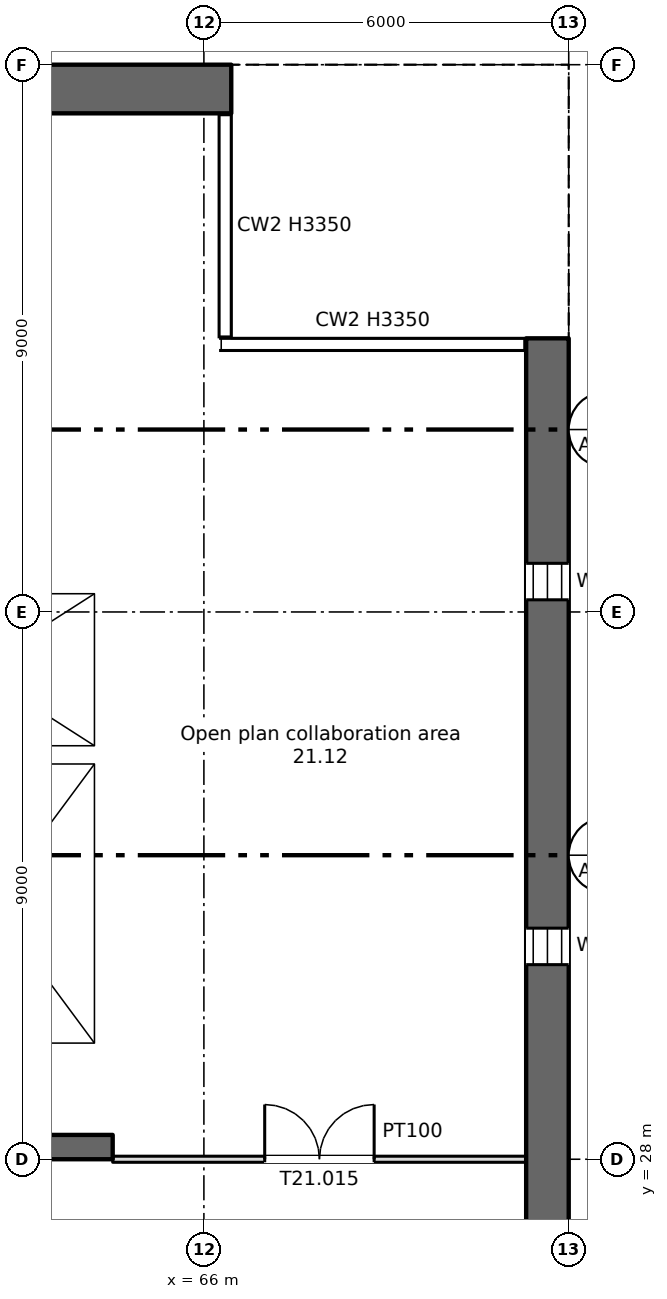
"""IFC4 building model, lengths in metres.
Left out: names, types, materials, properties, quantities, classifications, styles, units other than length and angle.
Written with IfcOpenShell. Run it as: python <this file> out.ifc"""

import sys

from ifc_helpers import new_model, si_unit, direction, frame, frame_2d, origin, place, context, subcontext, project, spatial, rectangle, extrude, element, fill, save


model = new_model("IFC4")
c1 = context("Model", 3, precision=1e-05, world=origin(), true_north=direction((0.0, 1.0)))
c2 = subcontext(c1, "Body", "Model", "MODEL_VIEW")
j1 = project(units=[si_unit("LENGTHUNIT", "METRE"), si_unit("PLANEANGLEUNIT", "RADIAN")], contexts=[c1])
p1 = place(None, origin())
s1 = spatial("IfcSite", under=j1, at=p1, CompositionType="ELEMENT")
p2 = place(p1, origin())
s2 = spatial("IfcBuilding", under=s1, at=p2, CompositionType="ELEMENT")
p3 = place(p2, frame((0.0, 0.0, 136.25)))
s3 = spatial("IfcBuildingStorey", under=s2, at=p3, CompositionType="ELEMENT", Elevation=136.25)
p4 = place(p3, frame((71.65, 6.0, 0.0), z_axis=(0.0, 0.0, 1.0), x_axis=(0.0, 1.0, 0.0)))
e1 = element("IfcWall", 1, at=p4, inside=s3, PredefinedType="SHEAR", context=c2, shape_type="SweptSolid", body=[
    extrude(rectangle(XDim=35.5, YDim=0.7, at=frame_2d((17.75, 0.0))), origin(), (0.0, 0.0, 1.0), 3.35),
])
p5 = place(p4, frame((1.2, 0.0, 0.6)))
e2 = element("IfcOpeningElement", 2, at=p5, cuts=e1, PredefinedType="OPENING", context=c2, shape_type="SweptSolid", body=[
    extrude(rectangle(XDim=0.6, YDim=2.4, at=frame_2d((0.3, 1.2))), frame((0.0, 0.36, 0.0), z_axis=(0.0, -1.0, 0.0), x_axis=(1.0, 0.0, 0.0)), (0.0, 0.0, 1.0), 0.72),
])
p6 = place(p4, frame((7.2, 0.0, 0.6)))
e3 = element("IfcOpeningElement", 3, at=p6, cuts=e1, PredefinedType="OPENING", context=c2, shape_type="SweptSolid", body=[
    extrude(rectangle(XDim=0.6, YDim=2.4, at=frame_2d((0.3, 1.2))), frame((0.0, 0.36, 0.0), z_axis=(0.0, -1.0, 0.0), x_axis=(1.0, 0.0, 0.0)), (0.0, 0.0, 1.0), 0.72),
])
p7 = place(p4, frame((13.2, 0.0, 0.6)))
e4 = element("IfcOpeningElement", 4, at=p7, cuts=e1, PredefinedType="OPENING", context=c2, shape_type="SweptSolid", body=[
    extrude(rectangle(XDim=0.6, YDim=2.4, at=frame_2d((0.3, 1.2))), frame((0.0, 0.36, 0.0), z_axis=(0.0, -1.0, 0.0), x_axis=(1.0, 0.0, 0.0)), (0.0, 0.0, 1.0), 0.72),
])
p8 = place(p4, frame((19.2, 0.0, 0.6)))
e5 = element("IfcOpeningElement", 5, at=p8, cuts=e1, PredefinedType="OPENING", context=c2, shape_type="SweptSolid", body=[
    extrude(rectangle(XDim=0.6, YDim=2.4, at=frame_2d((0.3, 1.2))), frame((0.0, 0.36, 0.0), z_axis=(0.0, -1.0, 0.0), x_axis=(1.0, 0.0, 0.0)), (0.0, 0.0, 1.0), 0.72),
])
p9 = place(p4, frame((25.2, 0.0, 0.6)))
e6 = element("IfcOpeningElement", 6, at=p9, cuts=e1, PredefinedType="OPENING", context=c2, shape_type="SweptSolid", body=[
    extrude(rectangle(XDim=0.6, YDim=2.4, at=frame_2d((0.3, 1.2))), frame((0.0, 0.36, 0.0), z_axis=(0.0, -1.0, 0.0), x_axis=(1.0, 0.0, 0.0)), (0.0, 0.0, 1.0), 0.72),
])
p10 = place(p4, frame((31.2, 0.0, 0.6)))
e7 = element("IfcOpeningElement", 7, at=p10, cuts=e1, PredefinedType="OPENING", context=c2, shape_type="SweptSolid", body=[
    extrude(rectangle(XDim=0.6, YDim=2.4, at=frame_2d((0.3, 1.2))), frame((0.0, 0.36, 0.0), z_axis=(0.0, -1.0, 0.0), x_axis=(1.0, 0.0, 0.0)), (0.0, 0.0, 1.0), 0.72),
])
p11 = place(p3, frame((5.55, 45.6, 0.0), z_axis=(0.0, 0.0, 1.0), x_axis=(1.0, 0.0, 0.0)))
e8 = element("IfcWall", 8, at=p11, inside=s3, PredefinedType="SHEAR", context=c2, shape_type="SweptSolid", body=[
    extrude(rectangle(XDim=60.9, YDim=0.8, at=frame_2d((30.45, 0.0))), origin(), (0.0, 0.0, 1.0), 3.35),
])
p12 = place(p11, frame((1.2, 0.0, 0.6)))
e9 = element("IfcOpeningElement", 9, at=p12, cuts=e8, PredefinedType="OPENING", context=c2, shape_type="SweptSolid", body=[
    extrude(rectangle(XDim=0.6, YDim=2.4, at=frame_2d((0.3, 1.2))), frame((0.0, 0.41, 0.0), z_axis=(0.0, -1.0, 0.0), x_axis=(1.0, 0.0, 0.0)), (0.0, 0.0, 1.0), 0.82),
])
p13 = place(p11, frame((7.2, 0.0, 0.6)))
e10 = element("IfcOpeningElement", 10, at=p13, cuts=e8, PredefinedType="OPENING", context=c2, shape_type="SweptSolid", body=[
    extrude(rectangle(XDim=0.6, YDim=2.4, at=frame_2d((0.3, 1.2))), frame((0.0, 0.41, 0.0), z_axis=(0.0, -1.0, 0.0), x_axis=(1.0, 0.0, 0.0)), (0.0, 0.0, 1.0), 0.82),
])
p14 = place(p11, frame((55.2, 0.0, 0.6)))
e11 = element("IfcOpeningElement", 11, at=p14, cuts=e8, PredefinedType="OPENING", context=c2, shape_type="SweptSolid", body=[
    extrude(rectangle(XDim=0.6, YDim=2.4, at=frame_2d((0.3, 1.2))), frame((0.0, 0.41, 0.0), z_axis=(0.0, -1.0, 0.0), x_axis=(1.0, 0.0, 0.0)), (0.0, 0.0, 1.0), 0.82),
])
p15 = place(p3, frame((6.7, 28.2, 0.0), z_axis=(0.0, 0.0, 1.0), x_axis=(1.0, 0.0, 0.0)))
e12 = element("IfcWall", 12, at=p15, inside=s3, PredefinedType="SHEAR", context=c2, shape_type="SweptSolid", body=[
    extrude(rectangle(XDim=57.8, YDim=0.4, at=frame_2d((28.9, 0.0))), origin(), (0.0, 0.0, 1.0), 3.35),
])
p16 = place(p15, frame((12.812, 0.0, 0.0)))
e13 = element("IfcOpeningElement", 13, at=p16, cuts=e12, PredefinedType="OPENING", context=c2, shape_type="SweptSolid", body=[
    extrude(rectangle(XDim=0.9, YDim=2.1, at=frame_2d((0.45, 1.05))), frame((0.0, 0.21, 0.0), z_axis=(0.0, -1.0, 0.0), x_axis=(1.0, 0.0, 0.0)), (0.0, 0.0, 1.0), 0.42),
])
p17 = place(p15, frame((15.387, 0.0, 0.0)))
e14 = element("IfcOpeningElement", 14, at=p17, cuts=e12, PredefinedType="OPENING", context=c2, shape_type="SweptSolid", body=[
    extrude(rectangle(XDim=0.9, YDim=2.1, at=frame_2d((0.45, 1.05))), frame((0.0, 0.21, 0.0), z_axis=(0.0, -1.0, 0.0), x_axis=(1.0, 0.0, 0.0)), (0.0, 0.0, 1.0), 0.42),
])
p18 = place(p15, frame((48.312, 0.0, 0.0)))
e15 = element("IfcOpeningElement", 15, at=p18, cuts=e12, PredefinedType="OPENING", context=c2, shape_type="SweptSolid", body=[
    extrude(rectangle(XDim=0.9, YDim=2.1, at=frame_2d((0.45, 1.05))), frame((0.0, 0.21, 0.0), z_axis=(0.0, -1.0, 0.0), x_axis=(1.0, 0.0, 0.0)), (0.0, 0.0, 1.0), 0.42),
])
p19 = place(p15, frame((50.887, 0.0, 0.0)))
e16 = element("IfcOpeningElement", 16, at=p19, cuts=e12, PredefinedType="OPENING", context=c2, shape_type="SweptSolid", body=[
    extrude(rectangle(XDim=0.9, YDim=2.1, at=frame_2d((0.45, 1.05))), frame((0.0, 0.21, 0.0), z_axis=(0.0, -1.0, 0.0), x_axis=(1.0, 0.0, 0.0)), (0.0, 0.0, 1.0), 0.42),
])
p20 = place(p15, frame((0.562, 0.0, 0.0)))
e17 = element("IfcOpeningElement", 17, at=p20, cuts=e12, PredefinedType="OPENING", context=c2, shape_type="SweptSolid", body=[
    extrude(rectangle(XDim=0.9, YDim=2.1, at=frame_2d((0.45, 1.05))), frame((0.0, 0.21, 0.0), z_axis=(0.0, -1.0, 0.0), x_axis=(1.0, 0.0, 0.0)), (0.0, 0.0, 1.0), 0.42),
])
p21 = place(p15, frame((2.137, 0.0, 0.0)))
e18 = element("IfcOpeningElement", 18, at=p21, cuts=e12, PredefinedType="OPENING", context=c2, shape_type="SweptSolid", body=[
    extrude(rectangle(XDim=0.9, YDim=2.1, at=frame_2d((0.45, 1.05))), frame((0.0, 0.21, 0.0), z_axis=(0.0, -1.0, 0.0), x_axis=(1.0, 0.0, 0.0)), (0.0, 0.0, 1.0), 0.42),
])
p22 = place(p15, frame((4.7, 0.0, 0.0)))
e19 = element("IfcOpeningElement", 19, at=p22, cuts=e12, PredefinedType="OPENING", context=c2, shape_type="SweptSolid", body=[
    extrude(rectangle(XDim=1.2, YDim=2.1, at=frame_2d((0.6, 1.05))), frame((0.0, 0.21, 0.0), z_axis=(0.0, -1.0, 0.0), x_axis=(1.0, 0.0, 0.0)), (0.0, 0.0, 1.0), 0.42),
])
p23 = place(p15, frame((31.7, 0.0, 0.0)))
e20 = element("IfcOpeningElement", 20, at=p23, cuts=e12, PredefinedType="OPENING", context=c2, shape_type="SweptSolid", body=[
    extrude(rectangle(XDim=1.2, YDim=2.1, at=frame_2d((0.6, 1.05))), frame((0.0, 0.21, 0.0), z_axis=(0.0, -1.0, 0.0), x_axis=(1.0, 0.0, 0.0)), (0.0, 0.0, 1.0), 0.42),
])
p24 = place(p15, frame((55.2, 0.0, 0.0)))
e21 = element("IfcOpeningElement", 21, at=p24, cuts=e12, PredefinedType="OPENING", context=c2, shape_type="SweptSolid", body=[
    extrude(rectangle(XDim=1.2, YDim=2.1, at=frame_2d((0.6, 1.05))), frame((0.0, 0.21, 0.0), z_axis=(0.0, -1.0, 0.0), x_axis=(1.0, 0.0, 0.0)), (0.0, 0.0, 1.0), 0.42),
])
p25 = place(p15, frame((21.7, 0.0, 0.0)))
e22 = element("IfcOpeningElement", 22, at=p25, cuts=e12, PredefinedType="OPENING", context=c2, shape_type="SweptSolid", body=[
    extrude(rectangle(XDim=1.2, YDim=2.1, at=frame_2d((0.6, 1.05))), frame((0.0, 0.21, 0.0), z_axis=(0.0, -1.0, 0.0), x_axis=(1.0, 0.0, 0.0)), (0.0, 0.0, 1.0), 0.42),
])
p26 = place(p15, frame((41.7, 0.0, 0.0)))
e23 = element("IfcOpeningElement", 23, at=p26, cuts=e12, PredefinedType="OPENING", context=c2, shape_type="SweptSolid", body=[
    extrude(rectangle(XDim=1.2, YDim=2.1, at=frame_2d((0.6, 1.05))), frame((0.0, 0.21, 0.0), z_axis=(0.0, -1.0, 0.0), x_axis=(1.0, 0.0, 0.0)), (0.0, 0.0, 1.0), 0.42),
])
p27 = place(p15, frame((24.85, 0.0, 0.0)))
e24 = element("IfcOpeningElement", 24, at=p27, cuts=e12, PredefinedType="OPENING", context=c2, shape_type="SweptSolid", body=[
    extrude(rectangle(XDim=2.4, YDim=2.1, at=frame_2d((1.2, 1.05))), frame((0.0, 0.21, 0.0), z_axis=(0.0, -1.0, 0.0), x_axis=(1.0, 0.0, 0.0)), (0.0, 0.0, 1.0), 0.42),
])
p28 = place(p15, frame((37.35, 0.0, 0.0)))
e25 = element("IfcOpeningElement", 25, at=p28, cuts=e12, PredefinedType="OPENING", context=c2, shape_type="SweptSolid", body=[
    extrude(rectangle(XDim=2.4, YDim=2.1, at=frame_2d((1.2, 1.05))), frame((0.0, 0.21, 0.0), z_axis=(0.0, -1.0, 0.0), x_axis=(1.0, 0.0, 0.0)), (0.0, 0.0, 1.0), 0.42),
])
p29 = place(p15, frame((7.95, 0.0, 0.0)))
e26 = element("IfcOpeningElement", 26, at=p29, cuts=e12, PredefinedType="OPENING", context=c2, shape_type="SweptSolid", body=[
    extrude(rectangle(XDim=2.4, YDim=2.1, at=frame_2d((1.2, 1.05))), frame((0.0, 0.21, 0.0), z_axis=(0.0, -1.0, 0.0), x_axis=(1.0, 0.0, 0.0)), (0.0, 0.0, 1.0), 0.42),
])
p30 = place(p15, frame((28.85, 0.0, 0.0)))
e27 = element("IfcOpeningElement", 27, at=p30, cuts=e12, PredefinedType="OPENING", context=c2, shape_type="SweptSolid", body=[
    extrude(rectangle(XDim=0.9, YDim=2.1, at=frame_2d((0.45, 1.05))), frame((0.0, 0.21, 0.0), z_axis=(0.0, -1.0, 0.0), x_axis=(1.0, 0.0, 0.0)), (0.0, 0.0, 1.0), 0.42),
])
p31 = place(p15, frame((34.85, 0.0, 0.0)))
e28 = element("IfcOpeningElement", 28, at=p31, cuts=e12, PredefinedType="OPENING", context=c2, shape_type="SweptSolid", body=[
    extrude(rectangle(XDim=0.9, YDim=2.1, at=frame_2d((0.45, 1.05))), frame((0.0, 0.21, 0.0), z_axis=(0.0, -1.0, 0.0), x_axis=(1.0, 0.0, 0.0)), (0.0, 0.0, 1.0), 0.42),
])
p32 = place(p3, frame((64.35, 34.8, 0.0), z_axis=(0.0, 0.0, 1.0), x_axis=(0.0, 1.0, 0.0)))
e29 = element("IfcWall", 29, at=p32, inside=s3, PredefinedType="SHEAR", context=c2, shape_type="SweptSolid", body=[
    extrude(rectangle(XDim=10.4, YDim=0.3, at=frame_2d((5.2, 0.0))), origin(), (0.0, 0.0, 1.0), 3.35),
])
p33 = place(p3, frame((64.35, 28.4, 0.0), z_axis=(0.0, 0.0, 1.0), x_axis=(0.0, 1.0, 0.0)))
e30 = element("IfcWall", 30, at=p33, inside=s3, PredefinedType="SHEAR", context=c2, shape_type="SweptSolid", body=[
    extrude(rectangle(XDim=6.1, YDim=0.3, at=frame_2d((3.05, 0.0))), origin(), (0.0, 0.0, 1.0), 3.35),
])
p34 = place(p3, frame((60.3, 34.65, 0.0), z_axis=(0.0, 0.0, 1.0), x_axis=(1.0, 0.0, 0.0)))
e31 = element("IfcWall", 31, at=p34, inside=s3, PredefinedType="SHEAR", context=c2, shape_type="SweptSolid", body=[
    extrude(rectangle(XDim=4.2, YDim=0.3, at=frame_2d((2.1, 0.0))), origin(), (0.0, 0.0, 1.0), 3.35),
])
p35 = place(p3, frame((60.3, 37.45, 0.0), z_axis=(0.0, 0.0, 1.0), x_axis=(1.0, 0.0, 0.0)))
e32 = element("IfcWall", 32, at=p35, inside=s3, PredefinedType="SHEAR", context=c2, shape_type="SweptSolid", body=[
    extrude(rectangle(XDim=3.9, YDim=0.3, at=frame_2d((1.95, 0.0))), origin(), (0.0, 0.0, 1.0), 3.35),
])
p36 = place(p35, frame((1.4, 0.0, 0.0)))
e33 = element("IfcOpeningElement", 33, at=p36, cuts=e32, PredefinedType="OPENING", context=c2, shape_type="SweptSolid", body=[
    extrude(rectangle(XDim=1.1, YDim=2.1, at=frame_2d((0.55, 1.05))), frame((0.0, 0.16, 0.0), z_axis=(0.0, -1.0, 0.0), x_axis=(1.0, 0.0, 0.0)), (0.0, 0.0, 1.0), 0.32),
])
p37 = place(p3, frame((64.5, 28.0, 0.0), z_axis=(0.0, 0.0, 1.0), x_axis=(1.0, 0.0, 0.0)))
e34 = element("IfcWall", 34, at=p37, inside=s3, PredefinedType="PARTITIONING", context=c2, shape_type="SweptSolid", body=[
    extrude(rectangle(XDim=6.8, YDim=0.1, at=frame_2d((3.4, 0.0))), origin(), (0.0, 0.0, 1.0), 3.35),
])
p38 = place(p37, frame((2.5, 0.0, 0.0)))
e35 = element("IfcOpeningElement", 35, at=p38, cuts=e34, PredefinedType="OPENING", context=c2, shape_type="SweptSolid", body=[
    extrude(rectangle(XDim=1.8, YDim=2.1, at=frame_2d((0.9, 1.05))), frame((0.0, 0.06, 0.0), z_axis=(0.0, -1.0, 0.0), x_axis=(1.0, 0.0, 0.0)), (0.0, 0.0, 1.0), 0.12),
])
p39 = place(p9, origin())
e36 = element("IfcWindow", 36, at=p39, inside=s3, PartitioningType="SINGLE_PANEL", PredefinedType="WINDOW", context=c2, shape_type="SweptSolid", body=[
    extrude(rectangle(XDim=0.6, YDim=2.4, at=frame_2d((0.3, 1.2))), frame((0.0, 0.03, 0.0), z_axis=(0.0, -1.0, 0.0), x_axis=(1.0, 0.0, 0.0)), (0.0, 0.0, 1.0), 0.06),
])
fill(e6, e36)
p40 = place(p10, origin())
e37 = element("IfcWindow", 37, at=p40, inside=s3, PartitioningType="SINGLE_PANEL", PredefinedType="WINDOW", context=c2, shape_type="SweptSolid", body=[
    extrude(rectangle(XDim=0.6, YDim=2.4, at=frame_2d((0.3, 1.2))), frame((0.0, 0.03, 0.0), z_axis=(0.0, -1.0, 0.0), x_axis=(1.0, 0.0, 0.0)), (0.0, 0.0, 1.0), 0.06),
])
fill(e7, e37)
p41 = place(p38, origin())
e38 = element("IfcDoor", 38, at=p41, inside=s3, OperationType="DOUBLE_DOOR_SINGLE_SWING", PredefinedType="DOOR", context=c2, shape_type="SweptSolid", body=[
    extrude(rectangle(XDim=1.8, YDim=2.1, at=frame_2d((0.9, 1.05))), frame((0.0, 0.025, 0.0), z_axis=(0.0, -1.0, 0.0), x_axis=(1.0, 0.0, 0.0)), (0.0, 0.0, 1.0), 0.05),
])
fill(e35, e38)
save(model, sys.argv[1])
